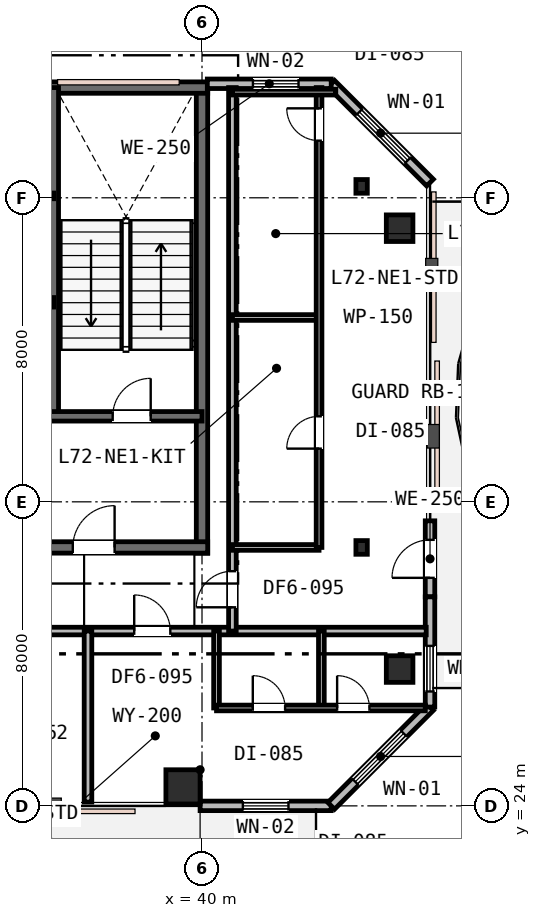
"""IFC4 building model, lengths in metres.
Left out: names, types, materials, properties, quantities, classifications, styles, units other than length and angle.
Written with IfcOpenShell. Run it as: python <this file> out.ifc"""

import sys

from ifc_helpers import new_model, si_unit, direction, frame, frame_2d, origin, origin_2d, place, context, subcontext, project, spatial, rectangle, i_section, extrude, element, fill, save


model = new_model("IFC4")
c1 = context("Model", 3, precision=1e-05, world=origin(), true_north=direction((0.0, 1.0)))
c2 = subcontext(c1, "Body", "Model", "MODEL_VIEW")
j1 = project(units=[si_unit("LENGTHUNIT", "METRE"), si_unit("PLANEANGLEUNIT", "RADIAN")], contexts=[c1])
p1 = place(None, origin())
s1 = spatial("IfcSite", under=j1, at=p1, CompositionType="ELEMENT")
p2 = place(p1, origin())
s2 = spatial("IfcBuilding", under=s1, at=p2, CompositionType="ELEMENT")
p3 = place(p2, frame((0.0, 0.0, 279.2)))
s3 = spatial("IfcBuildingStorey", under=s2, at=p3, CompositionType="ELEMENT", Elevation=279.2)
p4 = place(p3, frame((40.0, 30.65, 0.0), z_axis=(0.0, 0.0, 1.0), x_axis=(0.0, 1.0, 0.0)))
e1 = element("IfcWall", 1, at=p4, inside=s3, PredefinedType="SHEAR", context=c2, shape_type="SweptSolid", body=[
    extrude(rectangle(XDim=12.3, YDim=0.3, at=frame_2d((6.15, 0.0))), origin(), (0.0, 0.0, 1.0), 3.8),
])
p5 = place(p3, frame((15.85, 42.9, 0.0), z_axis=(0.0, 0.0, 1.0), x_axis=(1.0, 0.0, 0.0)))
e2 = element("IfcWall", 2, at=p5, inside=s3, PredefinedType="SHEAR", context=c2, shape_type="SweptSolid", body=[
    extrude(rectangle(XDim=24.3, YDim=0.3, at=frame_2d((12.15, 0.0))), origin(), (0.0, 0.0, 1.0), 3.8),
])
p6 = place(p3, frame((28.95, 30.8, 0.0), z_axis=(0.0, 0.0, 1.0), x_axis=(1.0, 0.0, 0.0)))
e3 = element("IfcWall", 3, at=p6, inside=s3, PredefinedType="SHEAR", context=c2, shape_type="SweptSolid", body=[
    extrude(rectangle(XDim=11.2, YDim=0.3, at=frame_2d((5.6, 0.0))), origin(), (0.0, 0.0, 1.0), 3.8),
])
p7 = place(p6, frame((7.65, 0.0, 0.0)))
e4 = element("IfcOpeningElement", 4, at=p7, cuts=e3, PredefinedType="OPENING", context=c2, shape_type="SweptSolid", body=[
    extrude(rectangle(XDim=1.1, YDim=2.15, at=frame_2d((0.55, 1.075))), frame((0.0, 0.16, 0.0), z_axis=(0.0, -1.0, 0.0), x_axis=(1.0, 0.0, 0.0)), (0.0, 0.0, 1.0), 0.32),
])
p8 = place(p3, frame((36.1, 34.25, 0.0), z_axis=(0.0, 0.0, 1.0), x_axis=(0.0, 1.0, 0.0)))
e5 = element("IfcWall", 5, at=p8, inside=s3, PredefinedType="SHEAR", context=c2, shape_type="SweptSolid", body=[
    extrude(rectangle(XDim=8.65, YDim=0.25, at=frame_2d((4.325, 0.0))), origin(), (0.0, 0.0, 1.0), 3.8),
])
p9 = place(p3, frame((33.95, 34.25, 0.0), z_axis=(0.0, 0.0, 1.0), x_axis=(1.0, 0.0, 0.0)))
e6 = element("IfcWall", 6, at=p9, inside=s3, PredefinedType="SHEAR", context=c2, shape_type="SweptSolid", body=[
    extrude(rectangle(XDim=6.05, YDim=0.25, at=frame_2d((3.025, 0.0))), origin(), (0.0, 0.0, 1.0), 3.8),
])
p10 = place(p9, frame((3.7, 0.0, 0.0)))
e7 = element("IfcOpeningElement", 7, at=p10, cuts=e6, PredefinedType="OPENING", context=c2, shape_type="SweptSolid", body=[
    extrude(rectangle(XDim=1.0, YDim=2.15, at=frame_2d((0.5, 1.075))), frame((0.0, 0.135, 0.0), z_axis=(0.0, -1.0, 0.0), x_axis=(1.0, 0.0, 0.0)), (0.0, 0.0, 1.0), 0.27),
])
p11 = place(p9, frame((0.55, 0.0, 0.0)))
e8 = element("IfcOpeningElement", 8, at=p11, cuts=e6, PredefinedType="OPENING", context=c2, shape_type="SweptSolid", body=[
    extrude(rectangle(XDim=1.1, YDim=2.15, at=frame_2d((0.55, 1.075))), frame((0.0, 0.135, 0.0), z_axis=(0.0, -1.0, 0.0), x_axis=(1.0, 0.0, 0.0)), (0.0, 0.0, 1.0), 0.27),
])
p12 = place(p3, frame((19.9, 37.25, 0.0), z_axis=(0.0, 0.0, 1.0), x_axis=(1.0, 0.0, 0.0)))
e9 = element("IfcWall", 9, at=p12, inside=s3, PredefinedType="SHEAR", context=c2, shape_type="SweptSolid", body=[
    extrude(rectangle(XDim=16.2, YDim=0.25, at=frame_2d((8.1, 0.0))), origin(), (0.0, 0.0, 1.0), 3.8),
])
p13 = place(p12, frame((12.55, 0.0, 0.0)))
e10 = element("IfcOpeningElement", 10, at=p13, cuts=e9, PredefinedType="OPENING", context=c2, shape_type="SweptSolid", body=[
    extrude(rectangle(XDim=0.9, YDim=2.15, at=frame_2d((0.45, 1.075))), frame((0.0, 0.135, 0.0), z_axis=(0.0, -1.0, 0.0), x_axis=(1.0, 0.0, 0.0)), (0.0, 0.0, 1.0), 0.27),
])
p14 = place(p12, frame((2.5, 0.0, 0.0)))
e11 = element("IfcOpeningElement", 11, at=p14, cuts=e9, PredefinedType="OPENING", context=c2, shape_type="SweptSolid", body=[
    extrude(rectangle(XDim=1.05, YDim=2.15, at=frame_2d((0.525, 1.075))), frame((0.0, 0.135, 0.0), z_axis=(0.0, -1.0, 0.0), x_axis=(1.0, 0.0, 0.0)), (0.0, 0.0, 1.0), 0.27),
])
p15 = place(p12, frame((4.4, 0.0, 0.0)))
e12 = element("IfcOpeningElement", 12, at=p15, cuts=e9, PredefinedType="OPENING", context=c2, shape_type="SweptSolid", body=[
    extrude(rectangle(XDim=1.05, YDim=2.15, at=frame_2d((0.525, 1.075))), frame((0.0, 0.135, 0.0), z_axis=(0.0, -1.0, 0.0), x_axis=(1.0, 0.0, 0.0)), (0.0, 0.0, 1.0), 0.27),
])
p16 = place(p12, frame((6.3, 0.0, 0.0)))
e13 = element("IfcOpeningElement", 13, at=p16, cuts=e9, PredefinedType="OPENING", context=c2, shape_type="SweptSolid", body=[
    extrude(rectangle(XDim=1.05, YDim=2.15, at=frame_2d((0.525, 1.075))), frame((0.0, 0.135, 0.0), z_axis=(0.0, -1.0, 0.0), x_axis=(1.0, 0.0, 0.0)), (0.0, 0.0, 1.0), 0.27),
])
p17 = place(p3, frame((39.5, 24.5, 0.0), z_axis=(0.0, 0.0, 1.0), x_axis=(1.0, 0.0, 0.0)))
e14 = element("IfcColumn", 14, at=p17, inside=s3, PredefinedType="COLUMN", context=c2, shape_type="SweptSolid", body=[
    extrude(rectangle(XDim=0.9, YDim=0.9, at=origin_2d()), origin(), (0.0, 0.0, 1.0), 3.8),
])
for number, where, z_axis, x_axis in (
    (15, (45.2, 27.6, 0.0), (0.0, 0.0, 1.0), (1.0, 0.0, 0.0)),
    (16, (45.2, 39.2, 0.0), (0.0, 0.0, 1.0), (1.0, 0.0, 0.0)),
):
    element("IfcColumn", number, at=place(p3, frame(where, z_axis=z_axis, x_axis=x_axis)), inside=s3, PredefinedType="COLUMN", context=c2, shape_type="SweptSolid", body=[
        extrude(rectangle(XDim=0.7, YDim=0.7, at=origin_2d()), origin(), (0.0, 0.0, 1.0), 3.8),
    ])
for number, where, z_axis, x_axis in (
    (17, (44.2, 30.8, 0.0), (0.0, 0.0, 1.0), (1.0, 0.0, 0.0)),
    (18, (44.2, 40.3, 0.0), (0.0, 0.0, 1.0), (1.0, 0.0, 0.0)),
):
    element("IfcColumn", number, at=place(p3, frame(where, z_axis=z_axis, x_axis=x_axis)), inside=s3, PredefinedType="COLUMN", context=c2, shape_type="SweptSolid", body=[
        extrude(i_section(OverallWidth=0.3, OverallDepth=0.36, WebThickness=0.013, FlangeThickness=0.022, FilletRadius=0.027, at=origin_2d()), origin(), (0.0, 0.0, 1.0), 3.8),
    ])
p18 = place(p3, frame((39.95, 24.0, 0.0), z_axis=(0.0, 0.0, 1.0), x_axis=(1.0, 0.0, 0.0)))
e19 = element("IfcWall", 19, at=p18, inside=s3, PredefinedType="STANDARD", context=c2, shape_type="SweptSolid", body=[
    extrude(rectangle(XDim=3.45, YDim=0.25, at=frame_2d((1.725, 0.0))), origin(), (0.0, 0.0, 1.0), 3.53),
])
p19 = place(p18, frame((1.125, 0.0, 0.85)))
e20 = element("IfcOpeningElement", 20, at=p19, cuts=e19, PredefinedType="OPENING", context=c2, shape_type="SweptSolid", body=[
    extrude(rectangle(XDim=1.2, YDim=1.6, at=frame_2d((0.6, 0.8))), frame((0.0, 0.135, 0.0), z_axis=(0.0, -1.0, 0.0), x_axis=(1.0, 0.0, 0.0)), (0.0, 0.0, 1.0), 0.27),
])
p20 = place(p3, frame((43.4, 24.0, 0.0), z_axis=(0.0, 0.0, 1.0), x_axis=(0.707106781187, 0.707106781187, 0.0)))
e21 = element("IfcWall", 21, at=p20, inside=s3, PredefinedType="STANDARD", context=c2, shape_type="SweptSolid", body=[
    extrude(rectangle(XDim=3.677, YDim=0.25, at=frame_2d((1.839, 0.0))), origin(), (0.0, 0.0, 1.0), 3.53),
])
p21 = place(p20, frame((0.896, 0.0, 0.75)))
e22 = element("IfcOpeningElement", 22, at=p21, cuts=e21, PredefinedType="OPENING", context=c2, shape_type="SweptSolid", body=[
    extrude(rectangle(XDim=1.8, YDim=1.85, at=frame_2d((0.9, 0.925))), frame((0.0, 0.135, 0.0), z_axis=(0.0, -1.0, 0.0), x_axis=(1.0, 0.0, 0.0)), (0.0, 0.0, 1.0), 0.27),
])
p22 = place(p3, frame((46.0, 29.5, 0.0), z_axis=(0.0, 0.0, 1.0), x_axis=(0.0, 1.0, 0.0)))
e23 = element("IfcWall", 23, at=p22, inside=s3, PredefinedType="STANDARD", context=c2, shape_type="SweptSolid", body=[
    extrude(rectangle(XDim=2.0, YDim=0.25, at=frame_2d((1.0, 0.0))), origin(), (0.0, 0.0, 1.0), 3.53),
])
p23 = place(p22, frame((0.5, 0.0, 0.0)))
e24 = element("IfcOpeningElement", 24, at=p23, cuts=e23, PredefinedType="OPENING", context=c2, shape_type="SweptSolid", body=[
    extrude(rectangle(XDim=1.0, YDim=2.15, at=frame_2d((0.5, 1.075))), frame((0.0, 0.135, 0.0), z_axis=(0.0, -1.0, 0.0), x_axis=(1.0, 0.0, 0.0)), (0.0, 0.0, 1.0), 0.27),
])
p24 = place(p3, frame((46.0, 26.6, 0.0), z_axis=(0.0, 0.0, 1.0), x_axis=(0.0, 1.0, 0.0)))
e25 = element("IfcWall", 25, at=p24, inside=s3, PredefinedType="STANDARD", context=c2, shape_type="SweptSolid", body=[
    extrude(rectangle(XDim=2.9, YDim=0.25, at=frame_2d((1.45, 0.0))), origin(), (0.0, 0.0, 1.0), 3.53),
])
p25 = place(p24, frame((0.41, 0.0, 0.85)))
e26 = element("IfcOpeningElement", 26, at=p25, cuts=e25, PredefinedType="OPENING", context=c2, shape_type="SweptSolid", body=[
    extrude(rectangle(XDim=1.2, YDim=1.6, at=frame_2d((0.6, 0.8))), frame((0.0, 0.135, 0.0), z_axis=(0.0, -1.0, 0.0), x_axis=(1.0, 0.0, 0.0)), (0.0, 0.0, 1.0), 0.27),
])
p26 = place(p3, frame((46.0, 40.4, 0.0), z_axis=(0.0, 0.0, 1.0), x_axis=(-0.707106781187, 0.707106781187, 0.0)))
e27 = element("IfcWall", 27, at=p26, inside=s3, PredefinedType="STANDARD", context=c2, shape_type="SweptSolid", body=[
    extrude(rectangle(XDim=3.677, YDim=0.25, at=frame_2d((1.839, 0.0))), origin(), (0.0, 0.0, 1.0), 3.53),
])
p27 = place(p26, frame((0.828, 0.0, 0.75)))
e28 = element("IfcOpeningElement", 28, at=p27, cuts=e27, PredefinedType="OPENING", context=c2, shape_type="SweptSolid", body=[
    extrude(rectangle(XDim=1.8, YDim=1.85, at=frame_2d((0.9, 0.925))), frame((0.0, 0.135, 0.0), z_axis=(0.0, -1.0, 0.0), x_axis=(1.0, 0.0, 0.0)), (0.0, 0.0, 1.0), 0.27),
])
p28 = place(p3, frame((43.4, 43.0, 0.0), z_axis=(0.0, 0.0, 1.0), x_axis=(-1.0, 0.0, 0.0)))
e29 = element("IfcWall", 29, at=p28, inside=s3, PredefinedType="STANDARD", context=c2, shape_type="SweptSolid", body=[
    extrude(rectangle(XDim=3.26, YDim=0.25, at=frame_2d((1.63, 0.0))), origin(), (0.0, 0.0, 1.0), 3.53),
])
p29 = place(p28, frame((0.86, 0.0, 0.85)))
e30 = element("IfcOpeningElement", 30, at=p29, cuts=e29, PredefinedType="OPENING", context=c2, shape_type="SweptSolid", body=[
    extrude(rectangle(XDim=1.2, YDim=1.6, at=frame_2d((0.6, 0.8))), frame((0.0, 0.135, 0.0), z_axis=(0.0, -1.0, 0.0), x_axis=(1.0, 0.0, 0.0)), (0.0, 0.0, 1.0), 0.27),
])
p30 = place(p3, frame((34.05, 40.05, 0.0), z_axis=(0.0, 0.0, 1.0), x_axis=(1.0, 0.0, 0.0)))
e31 = element("IfcWall", 31, at=p30, inside=s3, PredefinedType="PARTITIONING", context=c2, shape_type="SweptSolid", body=[
    extrude(rectangle(XDim=2.05, YDim=0.15, at=frame_2d((1.025, 0.0))), origin(), (0.0, 0.0, 1.0), 3.53),
])
p31 = place(p3, frame((14.2, 28.6, 0.0), z_axis=(0.0, 0.0, 1.0), x_axis=(1.0, 0.0, 0.0)))
e32 = element("IfcWall", 32, at=p31, inside=s3, PredefinedType="PARTITIONING", context=c2, shape_type="SweptSolid", body=[
    extrude(rectangle(XDim=31.7, YDim=0.2, at=frame_2d((15.85, 0.0))), origin(), (0.0, 0.0, 1.0), 3.16),
])
p32 = place(p31, frame((12.625, 0.0, 0.0)))
e33 = element("IfcOpeningElement", 33, at=p32, cuts=e32, PredefinedType="OPENING", context=c2, shape_type="SweptSolid", body=[
    extrude(rectangle(XDim=0.95, YDim=2.15, at=frame_2d((0.475, 1.075))), frame((0.0, 0.11, 0.0), z_axis=(0.0, -1.0, 0.0), x_axis=(1.0, 0.0, 0.0)), (0.0, 0.0, 1.0), 0.22),
])
p33 = place(p31, frame((19.125, 0.0, 0.0)))
e34 = element("IfcOpeningElement", 34, at=p33, cuts=e32, PredefinedType="OPENING", context=c2, shape_type="SweptSolid", body=[
    extrude(rectangle(XDim=0.95, YDim=2.15, at=frame_2d((0.475, 1.075))), frame((0.0, 0.11, 0.0), z_axis=(0.0, -1.0, 0.0), x_axis=(1.0, 0.0, 0.0)), (0.0, 0.0, 1.0), 0.22),
])
p34 = place(p31, frame((24.016, 0.0, 0.0)))
e35 = element("IfcOpeningElement", 35, at=p34, cuts=e32, PredefinedType="OPENING", context=c2, shape_type="SweptSolid", body=[
    extrude(rectangle(XDim=0.95, YDim=2.15, at=frame_2d((0.475, 1.075))), frame((0.0, 0.11, 0.0), z_axis=(0.0, -1.0, 0.0), x_axis=(1.0, 0.0, 0.0)), (0.0, 0.0, 1.0), 0.22),
])
p35 = place(p3, frame((40.8, 28.6, 0.0), z_axis=(0.0, 0.0, 1.0), x_axis=(0.0, 1.0, 0.0)))
e36 = element("IfcWall", 36, at=p35, inside=s3, PredefinedType="PARTITIONING", context=c2, shape_type="SweptSolid", body=[
    extrude(rectangle(XDim=14.3, YDim=0.2, at=frame_2d((7.15, 0.0))), origin(), (0.0, 0.0, 1.0), 3.16),
])
p36 = place(p35, frame((0.625, 0.0, 0.0)))
e37 = element("IfcOpeningElement", 37, at=p36, cuts=e36, PredefinedType="OPENING", context=c2, shape_type="SweptSolid", body=[
    extrude(rectangle(XDim=0.95, YDim=2.15, at=frame_2d((0.475, 1.075))), frame((0.0, 0.11, 0.0), z_axis=(0.0, -1.0, 0.0), x_axis=(1.0, 0.0, 0.0)), (0.0, 0.0, 1.0), 0.22),
])
p37 = place(p3, frame((40.8, 30.8, 0.0), z_axis=(0.0, 0.0, 1.0), x_axis=(1.0, 0.0, 0.0)))
e38 = element("IfcWall", 38, at=p37, inside=s3, PredefinedType="PARTITIONING", context=c2, shape_type="SweptSolid", body=[
    extrude(rectangle(XDim=2.28, YDim=0.15, at=frame_2d((1.14, 0.0))), origin(), (0.0, 0.0, 1.0), 3.16),
])
p38 = place(p3, frame((40.8, 36.85, 0.0), z_axis=(0.0, 0.0, 1.0), x_axis=(1.0, 0.0, 0.0)))
e39 = element("IfcWall", 39, at=p38, inside=s3, PredefinedType="PARTITIONING", context=c2, shape_type="SweptSolid", body=[
    extrude(rectangle(XDim=2.28, YDim=0.15, at=frame_2d((1.14, 0.0))), origin(), (0.0, 0.0, 1.0), 3.53),
])
p39 = place(p3, frame((43.08, 30.8, 0.0), z_axis=(0.0, 0.0, 1.0), x_axis=(0.0, 1.0, 0.0)))
e40 = element("IfcWall", 40, at=p39, inside=s3, PredefinedType="PARTITIONING", context=c2, shape_type="SweptSolid", body=[
    extrude(rectangle(XDim=12.1, YDim=0.15, at=frame_2d((6.05, 0.0))), origin(), (0.0, 0.0, 1.0), 3.16),
])
p40 = place(p39, frame((2.6, 0.0, 0.0)))
e41 = element("IfcOpeningElement", 41, at=p40, cuts=e40, PredefinedType="OPENING", context=c2, shape_type="SweptSolid", body=[
    extrude(rectangle(XDim=0.85, YDim=2.15, at=frame_2d((0.425, 1.075))), frame((0.0, 0.085, 0.0), z_axis=(0.0, -1.0, 0.0), x_axis=(1.0, 0.0, 0.0)), (0.0, 0.0, 1.0), 0.17),
])
p41 = place(p39, frame((10.704, 0.0, 0.0)))
e42 = element("IfcOpeningElement", 42, at=p41, cuts=e40, PredefinedType="OPENING", context=c2, shape_type="SweptSolid", body=[
    extrude(rectangle(XDim=0.85, YDim=2.15, at=frame_2d((0.425, 1.075))), frame((0.0, 0.085, 0.0), z_axis=(0.0, -1.0, 0.0), x_axis=(1.0, 0.0, 0.0)), (0.0, 0.0, 1.0), 0.17),
])
p42 = place(p3, frame((40.8, 42.78, 0.0), z_axis=(0.0, 0.0, 1.0), x_axis=(1.0, 0.0, 0.0)))
e43 = element("IfcWall", 43, at=p42, inside=s3, PredefinedType="PARTITIONING", context=c2, shape_type="SweptSolid", body=[
    extrude(rectangle(XDim=2.72, YDim=0.15, at=frame_2d((1.36, 0.0))), origin(), (0.0, 0.0, 1.0), 3.53),
])
p43 = place(p3, frame((37.0, 24.1, 0.0), z_axis=(0.0, 0.0, 1.0), x_axis=(0.0, 1.0, 0.0)))
e44 = element("IfcWall", 44, at=p43, inside=s3, PredefinedType="PARTITIONING", context=c2, shape_type="SweptSolid", body=[
    extrude(rectangle(XDim=4.5, YDim=0.2, at=frame_2d((2.25, 0.0))), origin(), (0.0, 0.0, 1.0), 3.27),
])
for number, where, z_axis, x_axis in (
    (45, (40.382, 26.576, 0.0), (0.0, 0.0, 1.0), (0.0, 1.0, 0.0)),
    (46, (43.141, 26.576, 0.0), (0.0, 0.0, 1.0), (0.0, 1.0, 0.0)),
):
    element("IfcWall", number, at=place(p3, frame(where, z_axis=z_axis, x_axis=x_axis)), inside=s3, PredefinedType="PARTITIONING", context=c2, shape_type="SweptSolid", body=[
        extrude(rectangle(XDim=2.024, YDim=0.15, at=frame_2d((1.012, 0.0))), origin(), (0.0, 0.0, 1.0), 3.53),
    ])
p44 = place(p3, frame((40.382, 26.576, 0.0), z_axis=(0.0, 0.0, 1.0), x_axis=(1.0, 0.0, 0.0)))
e47 = element("IfcWall", 47, at=p44, inside=s3, PredefinedType="PARTITIONING", context=c2, shape_type="SweptSolid", body=[
    extrude(rectangle(XDim=5.494, YDim=0.15, at=frame_2d((2.747, 0.0))), origin(), (0.0, 0.0, 1.0), 3.53),
])
p45 = place(p44, frame((0.955, 0.0, 0.0)))
e48 = element("IfcOpeningElement", 48, at=p45, cuts=e47, PredefinedType="OPENING", context=c2, shape_type="SweptSolid", body=[
    extrude(rectangle(XDim=0.85, YDim=2.15, at=frame_2d((0.425, 1.075))), frame((0.0, 0.085, 0.0), z_axis=(0.0, -1.0, 0.0), x_axis=(1.0, 0.0, 0.0)), (0.0, 0.0, 1.0), 0.17),
])
p46 = place(p44, frame((3.174, 0.0, 0.0)))
e49 = element("IfcOpeningElement", 49, at=p46, cuts=e47, PredefinedType="OPENING", context=c2, shape_type="SweptSolid", body=[
    extrude(rectangle(XDim=0.85, YDim=2.15, at=frame_2d((0.425, 1.075))), frame((0.0, 0.085, 0.0), z_axis=(0.0, -1.0, 0.0), x_axis=(1.0, 0.0, 0.0)), (0.0, 0.0, 1.0), 0.17),
])
p47 = place(p19, origin())
e50 = element("IfcWindow", 50, at=p47, inside=s3, PartitioningType="SINGLE_PANEL", PredefinedType="WINDOW", context=c2, shape_type="SweptSolid", body=[
    extrude(rectangle(XDim=1.2, YDim=1.6, at=frame_2d((0.6, 0.8))), frame((0.0, 0.03, 0.0), z_axis=(0.0, -1.0, 0.0), x_axis=(1.0, 0.0, 0.0)), (0.0, 0.0, 1.0), 0.06),
])
fill(e20, e50)
p48 = place(p21, origin())
e51 = element("IfcWindow", 51, at=p48, inside=s3, PartitioningType="SINGLE_PANEL", PredefinedType="WINDOW", context=c2, shape_type="SweptSolid", body=[
    extrude(rectangle(XDim=1.8, YDim=1.85, at=frame_2d((0.9, 0.925))), frame((0.0, 0.03, 0.0), z_axis=(0.0, -1.0, 0.0), x_axis=(1.0, 0.0, 0.0)), (0.0, 0.0, 1.0), 0.06),
])
fill(e22, e51)
p49 = place(p23, origin())
e52 = element("IfcDoor", 52, at=p49, inside=s3, OperationType="SINGLE_SWING_LEFT", PredefinedType="DOOR", context=c2, shape_type="SweptSolid", body=[
    extrude(rectangle(XDim=1.0, YDim=2.15, at=frame_2d((0.5, 1.075))), frame((0.0, 0.025, 0.0), z_axis=(0.0, -1.0, 0.0), x_axis=(1.0, 0.0, 0.0)), (0.0, 0.0, 1.0), 0.05),
])
fill(e24, e52)
p50 = place(p25, origin())
e53 = element("IfcWindow", 53, at=p50, inside=s3, PartitioningType="SINGLE_PANEL", PredefinedType="WINDOW", context=c2, shape_type="SweptSolid", body=[
    extrude(rectangle(XDim=1.2, YDim=1.6, at=frame_2d((0.6, 0.8))), frame((0.0, 0.03, 0.0), z_axis=(0.0, -1.0, 0.0), x_axis=(1.0, 0.0, 0.0)), (0.0, 0.0, 1.0), 0.06),
])
fill(e26, e53)
p51 = place(p27, origin())
e54 = element("IfcWindow", 54, at=p51, inside=s3, PartitioningType="SINGLE_PANEL", PredefinedType="WINDOW", context=c2, shape_type="SweptSolid", body=[
    extrude(rectangle(XDim=1.8, YDim=1.85, at=frame_2d((0.9, 0.925))), frame((0.0, 0.03, 0.0), z_axis=(0.0, -1.0, 0.0), x_axis=(1.0, 0.0, 0.0)), (0.0, 0.0, 1.0), 0.06),
])
fill(e28, e54)
p52 = place(p29, origin())
e55 = element("IfcWindow", 55, at=p52, inside=s3, PartitioningType="SINGLE_PANEL", PredefinedType="WINDOW", context=c2, shape_type="SweptSolid", body=[
    extrude(rectangle(XDim=1.2, YDim=1.6, at=frame_2d((0.6, 0.8))), frame((0.0, 0.03, 0.0), z_axis=(0.0, -1.0, 0.0), x_axis=(1.0, 0.0, 0.0)), (0.0, 0.0, 1.0), 0.06),
])
fill(e30, e55)
p53 = place(p10, origin())
e56 = element("IfcDoor", 56, at=p53, inside=s3, OperationType="SINGLE_SWING_RIGHT", PredefinedType="DOOR", context=c2, shape_type="SweptSolid", body=[
    extrude(rectangle(XDim=1.0, YDim=2.15, at=frame_2d((0.5, 1.075))), frame((0.0, 0.025, 0.0), z_axis=(0.0, -1.0, 0.0), x_axis=(1.0, 0.0, 0.0)), (0.0, 0.0, 1.0), 0.05),
])
fill(e7, e56)
p54 = place(p7, origin())
e57 = element("IfcDoor", 57, at=p54, inside=s3, OperationType="SINGLE_SWING_RIGHT", PredefinedType="DOOR", context=c2, shape_type="SweptSolid", body=[
    extrude(rectangle(XDim=1.1, YDim=2.15, at=frame_2d((0.55, 1.075))), frame((0.0, 0.025, 0.0), z_axis=(0.0, -1.0, 0.0), x_axis=(1.0, 0.0, 0.0)), (0.0, 0.0, 1.0), 0.05),
])
fill(e4, e57)
p55 = place(p36, origin())
e58 = element("IfcDoor", 58, at=p55, inside=s3, OperationType="SINGLE_SWING_LEFT", PredefinedType="DOOR", context=c2, shape_type="SweptSolid", body=[
    extrude(rectangle(XDim=0.95, YDim=2.15, at=frame_2d((0.475, 1.075))), frame((0.0, 0.025, 0.0), z_axis=(0.0, -1.0, 0.0), x_axis=(1.0, 0.0, 0.0)), (0.0, 0.0, 1.0), 0.05),
])
fill(e37, e58)
p56 = place(p40, origin())
e59 = element("IfcDoor", 59, at=p56, inside=s3, OperationType="SINGLE_SWING_LEFT", PredefinedType="DOOR", context=c2, shape_type="SweptSolid", body=[
    extrude(rectangle(XDim=0.85, YDim=2.15, at=frame_2d((0.425, 1.075))), frame((0.0, 0.025, 0.0), z_axis=(0.0, -1.0, 0.0), x_axis=(1.0, 0.0, 0.0)), (0.0, 0.0, 1.0), 0.05),
])
fill(e41, e59)
p57 = place(p41, origin())
e60 = element("IfcDoor", 60, at=p57, inside=s3, OperationType="SINGLE_SWING_RIGHT", PredefinedType="DOOR", context=c2, shape_type="SweptSolid", body=[
    extrude(rectangle(XDim=0.85, YDim=2.15, at=frame_2d((0.425, 1.075))), frame((0.0, 0.025, 0.0), z_axis=(0.0, -1.0, 0.0), x_axis=(1.0, 0.0, 0.0)), (0.0, 0.0, 1.0), 0.05),
])
fill(e42, e60)
p58 = place(p34, origin())
e61 = element("IfcDoor", 61, at=p58, inside=s3, OperationType="SINGLE_SWING_LEFT", PredefinedType="DOOR", context=c2, shape_type="SweptSolid", body=[
    extrude(rectangle(XDim=0.95, YDim=2.15, at=frame_2d((0.475, 1.075))), frame((0.0, 0.025, 0.0), z_axis=(0.0, -1.0, 0.0), x_axis=(1.0, 0.0, 0.0)), (0.0, 0.0, 1.0), 0.05),
])
fill(e35, e61)
p59 = place(p45, origin())
e62 = element("IfcDoor", 62, at=p59, inside=s3, OperationType="SINGLE_SWING_LEFT", PredefinedType="DOOR", context=c2, shape_type="SweptSolid", body=[
    extrude(rectangle(XDim=0.85, YDim=2.15, at=frame_2d((0.425, 1.075))), frame((0.0, 0.025, 0.0), z_axis=(0.0, -1.0, 0.0), x_axis=(1.0, 0.0, 0.0)), (0.0, 0.0, 1.0), 0.05),
])
fill(e48, e62)
p60 = place(p46, origin())
e63 = element("IfcDoor", 63, at=p60, inside=s3, OperationType="SINGLE_SWING_LEFT", PredefinedType="DOOR", context=c2, shape_type="SweptSolid", body=[
    extrude(rectangle(XDim=0.85, YDim=2.15, at=frame_2d((0.425, 1.075))), frame((0.0, 0.025, 0.0), z_axis=(0.0, -1.0, 0.0), x_axis=(1.0, 0.0, 0.0)), (0.0, 0.0, 1.0), 0.05),
])
fill(e49, e63)
save(model, sys.argv[1])
